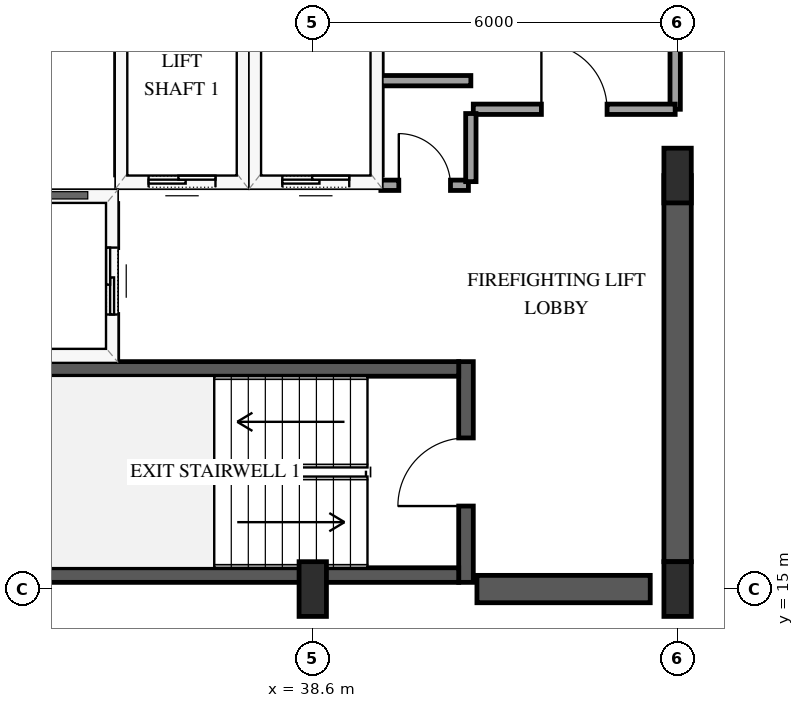
"""IFC4 building model, lengths in metres.
Left out: names, types, materials, properties, quantities, classifications, styles, units other than length and angle.
Written with IfcOpenShell. Run it as: python <this file> out.ifc"""

import sys

from ifc_helpers import new_model, si_unit, direction, frame, frame_2d, origin, origin_2d, place, context, subcontext, project, spatial, rectangle, extrude, element, fill, save


model = new_model("IFC4")
c1 = context("Model", 3, precision=1e-05, world=origin(), true_north=direction((0.0, 1.0)))
c2 = subcontext(c1, "Body", "Model", "MODEL_VIEW")
j1 = project(units=[si_unit("LENGTHUNIT", "METRE"), si_unit("PLANEANGLEUNIT", "RADIAN")], contexts=[c1])
p1 = place(None, origin())
s1 = spatial("IfcSite", under=j1, at=p1, CompositionType="ELEMENT")
p2 = place(p1, origin())
s2 = spatial("IfcBuilding", under=s1, at=p2, CompositionType="ELEMENT")
p3 = place(p2, frame((0.0, 0.0, 230.2)))
s3 = spatial("IfcBuildingStorey", under=s2, at=p3, CompositionType="ELEMENT", Elevation=230.2)
p4 = place(p3, frame((41.12, 15.11, 0.0), z_axis=(0.0, 0.0, 1.0), x_axis=(0.0, 1.0, 0.0)))
e1 = element("IfcWall", 1, at=p4, inside=s3, PredefinedType="SHEAR", context=c2, shape_type="SweptSolid", body=[
    extrude(rectangle(XDim=3.63, YDim=0.24, at=frame_2d((1.815, 0.0))), origin(), (0.0, 0.0, 1.0), 3.6),
])
p5 = place(p4, frame((1.255, 0.0, 0.0)))
e2 = element("IfcOpeningElement", 2, at=p5, cuts=e1, PredefinedType="OPENING", context=c2, shape_type="SweptSolid", body=[
    extrude(rectangle(XDim=1.12, YDim=2.15, at=frame_2d((0.56, 1.075))), frame((0.0, 0.13, 0.0), z_axis=(0.0, -1.0, 0.0), x_axis=(1.0, 0.0, 0.0)), (0.0, 0.0, 1.0), 0.26),
])
for number, where, z_axis, x_axis in (
    (3, (33.0, 15.23, 0.0), (0.0, 0.0, 1.0), (1.0, 0.0, 0.0)),
    (4, (33.0, 18.62, 0.0), (0.0, 0.0, 1.0), (1.0, 0.0, 0.0)),
):
    element("IfcWall", number, at=place(p3, frame(where, z_axis=z_axis, x_axis=x_axis)), inside=s3, PredefinedType="SHEAR", context=c2, shape_type="SweptSolid", body=[
        extrude(rectangle(XDim=8.0, YDim=0.24, at=frame_2d((4.0, 0.0))), origin(), (0.0, 0.0, 1.0), 3.6),
    ])
p6 = place(p3, frame((41.3, 15.0, 0.0), z_axis=(0.0, 0.0, 1.0), x_axis=(1.0, 0.0, 0.0)))
e5 = element("IfcWall", 5, at=p6, inside=s3, PredefinedType="SHEAR", context=c2, shape_type="SweptSolid", body=[
    extrude(rectangle(XDim=2.85, YDim=0.45, at=frame_2d((1.425, 0.0))), origin(), (0.0, 0.0, 1.0), 3.6),
])
p7 = place(p3, frame((44.6, 15.45, 0.0), z_axis=(0.0, 0.0, 1.0), x_axis=(0.0, 1.0, 0.0)))
e6 = element("IfcWall", 6, at=p7, inside=s3, PredefinedType="SHEAR", context=c2, shape_type="SweptSolid", body=[
    extrude(rectangle(XDim=6.35, YDim=0.45, at=frame_2d((3.175, 0.0))), origin(), (0.0, 0.0, 1.0), 3.6),
])
for number, where, z_axis, x_axis in (
    (7, (38.6, 15.0, 0.0), (0.0, 0.0, 1.0), (1.0, 0.0, 0.0)),
    (8, (44.6, 15.0, 0.0), (0.0, 0.0, 1.0), (1.0, 0.0, 0.0)),
    (9, (44.6, 21.8, 0.0), (0.0, 0.0, 1.0), (1.0, 0.0, 0.0)),
):
    element("IfcColumn", number, at=place(p3, frame(where, z_axis=z_axis, x_axis=x_axis)), inside=s3, PredefinedType="PILASTER", context=c2, shape_type="SweptSolid", body=[
        extrude(rectangle(XDim=0.45, YDim=0.9, at=origin_2d()), origin(), (0.0, 0.0, 1.0), 3.6),
    ])
p8 = place(p3, frame((35.45, 21.7, 0.0), z_axis=(0.0, 0.0, 1.0), x_axis=(1.0, 0.0, 0.0)))
e10 = element("IfcWall", 10, at=p8, inside=s3, PredefinedType="SOLIDWALL", context=c2, shape_type="SweptSolid", body=[
    extrude(rectangle(XDim=2.0, YDim=0.185, at=frame_2d((1.0, 0.0))), origin(), (0.0, 0.0, 1.0), 3.3),
])
p9 = place(p8, frame((0.45, 0.0, 0.0)))
e11 = element("IfcOpeningElement", 11, at=p9, cuts=e10, PredefinedType="OPENING", context=c2, shape_type="SweptSolid", body=[
    extrude(rectangle(XDim=1.1, YDim=2.15, at=frame_2d((0.55, 1.075))), frame((0.0, 0.103, 0.0), z_axis=(0.0, -1.0, 0.0), x_axis=(1.0, 0.0, 0.0)), (0.0, 0.0, 1.0), 0.205),
])
for number, where, z_axis, x_axis in (
    (12, (35.45, 21.81, 0.0), (0.0, 0.0, 1.0), (0.0, 1.0, 0.0)),
    (13, (37.45, 21.81, 0.0), (0.0, 0.0, 1.0), (0.0, 1.0, 0.0)),
):
    element("IfcWall", number, at=place(p3, frame(where, z_axis=z_axis, x_axis=x_axis)), inside=s3, PredefinedType="SOLIDWALL", context=c2, shape_type="SweptSolid", body=[
        extrude(rectangle(XDim=2.38, YDim=0.185, at=frame_2d((1.19, 0.0))), origin(), (0.0, 0.0, 1.0), 3.3),
    ])
p10 = place(p3, frame((37.65, 21.7, 0.0), z_axis=(0.0, 0.0, 1.0), x_axis=(1.0, 0.0, 0.0)))
e14 = element("IfcWall", 14, at=p10, inside=s3, PredefinedType="SOLIDWALL", context=c2, shape_type="SweptSolid", body=[
    extrude(rectangle(XDim=2.0, YDim=0.185, at=frame_2d((1.0, 0.0))), origin(), (0.0, 0.0, 1.0), 3.3),
])
p11 = place(p10, frame((0.45, 0.0, 0.0)))
e15 = element("IfcOpeningElement", 15, at=p11, cuts=e14, PredefinedType="OPENING", context=c2, shape_type="SweptSolid", body=[
    extrude(rectangle(XDim=1.1, YDim=2.15, at=frame_2d((0.55, 1.075))), frame((0.0, 0.103, 0.0), z_axis=(0.0, -1.0, 0.0), x_axis=(1.0, 0.0, 0.0)), (0.0, 0.0, 1.0), 0.205),
])
p12 = place(p3, frame((39.65, 21.81, 0.0), z_axis=(0.0, 0.0, 1.0), x_axis=(0.0, 1.0, 0.0)))
e16 = element("IfcWall", 16, at=p12, inside=s3, PredefinedType="SOLIDWALL", context=c2, shape_type="SweptSolid", body=[
    extrude(rectangle(XDim=2.38, YDim=0.185, at=frame_2d((1.19, 0.0))), origin(), (0.0, 0.0, 1.0), 3.3),
])
p13 = place(p3, frame((32.72, 21.45, 0.0), z_axis=(0.0, 0.0, 1.0), x_axis=(1.0, 0.0, 0.0)))
e17 = element("IfcWall", 17, at=p13, inside=s3, PredefinedType="SOLIDWALL", context=c2, shape_type="SweptSolid", body=[
    extrude(rectangle(XDim=2.58, YDim=0.185, at=frame_2d((1.29, 0.0))), origin(), (0.0, 0.0, 1.0), 3.3),
])
p14 = place(p3, frame((35.3, 18.79, 0.0), z_axis=(0.0, 0.0, 1.0), x_axis=(0.0, 1.0, 0.0)))
e18 = element("IfcWall", 18, at=p14, inside=s3, PredefinedType="SOLIDWALL", context=c2, shape_type="SweptSolid", body=[
    extrude(rectangle(XDim=2.55, YDim=0.185, at=frame_2d((1.275, 0.0))), origin(), (0.0, 0.0, 1.0), 3.3),
])
p15 = place(p14, frame((0.725, 0.0, 0.0)))
e19 = element("IfcOpeningElement", 19, at=p15, cuts=e18, PredefinedType="OPENING", context=c2, shape_type="SweptSolid", body=[
    extrude(rectangle(XDim=1.1, YDim=2.15, at=frame_2d((0.55, 1.075))), frame((0.0, 0.103, 0.0), z_axis=(0.0, -1.0, 0.0), x_axis=(1.0, 0.0, 0.0)), (0.0, 0.0, 1.0), 0.205),
])
p16 = place(p3, frame((44.56, 29.8, 0.0), z_axis=(0.0, 0.0, 1.0), x_axis=(0.0, -1.0, 0.0)))
e20 = element("IfcWall", 20, at=p16, inside=s3, PredefinedType="PARTITIONING", context=c2, shape_type="SweptSolid", body=[
    extrude(rectangle(XDim=6.91, YDim=0.17, at=frame_2d((3.455, 0.0))), origin(), (0.0, 0.0, 1.0), 2.34),
])
p17 = place(p16, frame((2.915, 0.0, 0.0)))
e21 = element("IfcOpeningElement", 21, at=p17, cuts=e20, PredefinedType="OPENING", context=c2, shape_type="SweptSolid", body=[
    extrude(rectangle(XDim=1.08, YDim=2.15, at=frame_2d((0.54, 1.075))), frame((0.0, 0.095, 0.0), z_axis=(0.0, -1.0, 0.0), x_axis=(1.0, 0.0, 0.0)), (0.0, 0.0, 1.0), 0.19),
])
p18 = place(p3, frame((41.24, 22.89, 0.0), z_axis=(0.0, 0.0, 1.0), x_axis=(1.0, 0.0, 0.0)))
e22 = element("IfcWall", 22, at=p18, inside=s3, PredefinedType="PARTITIONING", context=c2, shape_type="SweptSolid", body=[
    extrude(rectangle(XDim=3.32, YDim=0.17, at=frame_2d((1.66, 0.0))), origin(), (0.0, 0.0, 1.0), 3.3),
])
p19 = place(p18, frame((1.12, 0.0, 0.0)))
e23 = element("IfcOpeningElement", 23, at=p19, cuts=e22, PredefinedType="OPENING", context=c2, shape_type="SweptSolid", body=[
    extrude(rectangle(XDim=1.08, YDim=2.15, at=frame_2d((0.54, 1.075))), frame((0.0, 0.095, 0.0), z_axis=(0.0, -1.0, 0.0), x_axis=(1.0, 0.0, 0.0)), (0.0, 0.0, 1.0), 0.19),
])
p20 = place(p3, frame((39.72, 21.64, 0.0), z_axis=(0.0, 0.0, 1.0), x_axis=(1.0, 0.0, 0.0)))
e24 = element("IfcWall", 24, at=p20, inside=s3, PredefinedType="PARTITIONING", context=c2, shape_type="SweptSolid", body=[
    extrude(rectangle(XDim=1.44, YDim=0.17, at=frame_2d((0.72, 0.0))), origin(), (0.0, 0.0, 1.0), 3.3),
])
p21 = place(p20, frame((0.295, 0.0, 0.0)))
e25 = element("IfcOpeningElement", 25, at=p21, cuts=e24, PredefinedType="OPENING", context=c2, shape_type="SweptSolid", body=[
    extrude(rectangle(XDim=0.85, YDim=2.1, at=frame_2d((0.425, 1.05))), frame((0.0, 0.095, 0.0), z_axis=(0.0, -1.0, 0.0), x_axis=(1.0, 0.0, 0.0)), (0.0, 0.0, 1.0), 0.19),
])
p22 = place(p3, frame((41.2, 21.7, 0.0), z_axis=(0.0, 0.0, 1.0), x_axis=(0.0, 1.0, 0.0)))
e26 = element("IfcWall", 26, at=p22, inside=s3, PredefinedType="PARTITIONING", context=c2, shape_type="SweptSolid", body=[
    extrude(rectangle(XDim=1.12, YDim=0.17, at=frame_2d((0.56, 0.0))), origin(), (0.0, 0.0, 1.0), 3.3),
])
p23 = place(p3, frame((41.2, 23.36, 0.0), z_axis=(0.0, 0.0, 1.0), x_axis=(-1.0, 0.0, 0.0)))
e27 = element("IfcWall", 27, at=p23, inside=s3, PredefinedType="PARTITIONING", context=c2, shape_type="SweptSolid", body=[
    extrude(rectangle(XDim=1.48, YDim=0.17, at=frame_2d((0.74, 0.0))), origin(), (0.0, 0.0, 1.0), 3.3),
])
p24 = place(p9, origin())
e28 = element("IfcDoor", 28, at=p24, inside=s3, OperationType="SLIDING_TO_LEFT", PredefinedType="DOOR", context=c2, shape_type="SweptSolid", body=[
    extrude(rectangle(XDim=1.1, YDim=2.15, at=frame_2d((0.55, 1.075))), frame((0.0, 0.025, 0.0), z_axis=(0.0, -1.0, 0.0), x_axis=(1.0, 0.0, 0.0)), (0.0, 0.0, 1.0), 0.05),
])
fill(e11, e28)
p25 = place(p11, origin())
e29 = element("IfcDoor", 29, at=p25, inside=s3, OperationType="SLIDING_TO_LEFT", PredefinedType="DOOR", context=c2, shape_type="SweptSolid", body=[
    extrude(rectangle(XDim=1.1, YDim=2.15, at=frame_2d((0.55, 1.075))), frame((0.0, 0.025, 0.0), z_axis=(0.0, -1.0, 0.0), x_axis=(1.0, 0.0, 0.0)), (0.0, 0.0, 1.0), 0.05),
])
fill(e15, e29)
p26 = place(p15, origin())
e30 = element("IfcDoor", 30, at=p26, inside=s3, OperationType="SLIDING_TO_LEFT", PredefinedType="DOOR", context=c2, shape_type="SweptSolid", body=[
    extrude(rectangle(XDim=1.1, YDim=2.15, at=frame_2d((0.55, 1.075))), frame((0.0, 0.025, 0.0), z_axis=(0.0, -1.0, 0.0), x_axis=(1.0, 0.0, 0.0)), (0.0, 0.0, 1.0), 0.05),
])
fill(e19, e30)
p27 = place(p5, origin())
e31 = element("IfcDoor", 31, at=p27, inside=s3, OperationType="SINGLE_SWING_LEFT", PredefinedType="DOOR", context=c2, shape_type="SweptSolid", body=[
    extrude(rectangle(XDim=1.12, YDim=2.15, at=frame_2d((0.56, 1.075))), frame((0.0, 0.025, 0.0), z_axis=(0.0, -1.0, 0.0), x_axis=(1.0, 0.0, 0.0)), (0.0, 0.0, 1.0), 0.05),
])
fill(e2, e31)
p28 = place(p19, origin())
e32 = element("IfcDoor", 32, at=p28, inside=s3, OperationType="SINGLE_SWING_LEFT", PredefinedType="DOOR", context=c2, shape_type="SweptSolid", body=[
    extrude(rectangle(XDim=1.08, YDim=2.15, at=frame_2d((0.54, 1.075))), frame((0.0, 0.025, 0.0), z_axis=(0.0, -1.0, 0.0), x_axis=(1.0, 0.0, 0.0)), (0.0, 0.0, 1.0), 0.05),
])
fill(e23, e32)
p29 = place(p21, origin())
e33 = element("IfcDoor", 33, at=p29, inside=s3, OperationType="SINGLE_SWING_LEFT", PredefinedType="DOOR", context=c2, shape_type="SweptSolid", body=[
    extrude(rectangle(XDim=0.85, YDim=2.1, at=frame_2d((0.425, 1.05))), frame((0.0, 0.025, 0.0), z_axis=(0.0, -1.0, 0.0), x_axis=(1.0, 0.0, 0.0)), (0.0, 0.0, 1.0), 0.05),
])
fill(e25, e33)
save(model, sys.argv[1])
